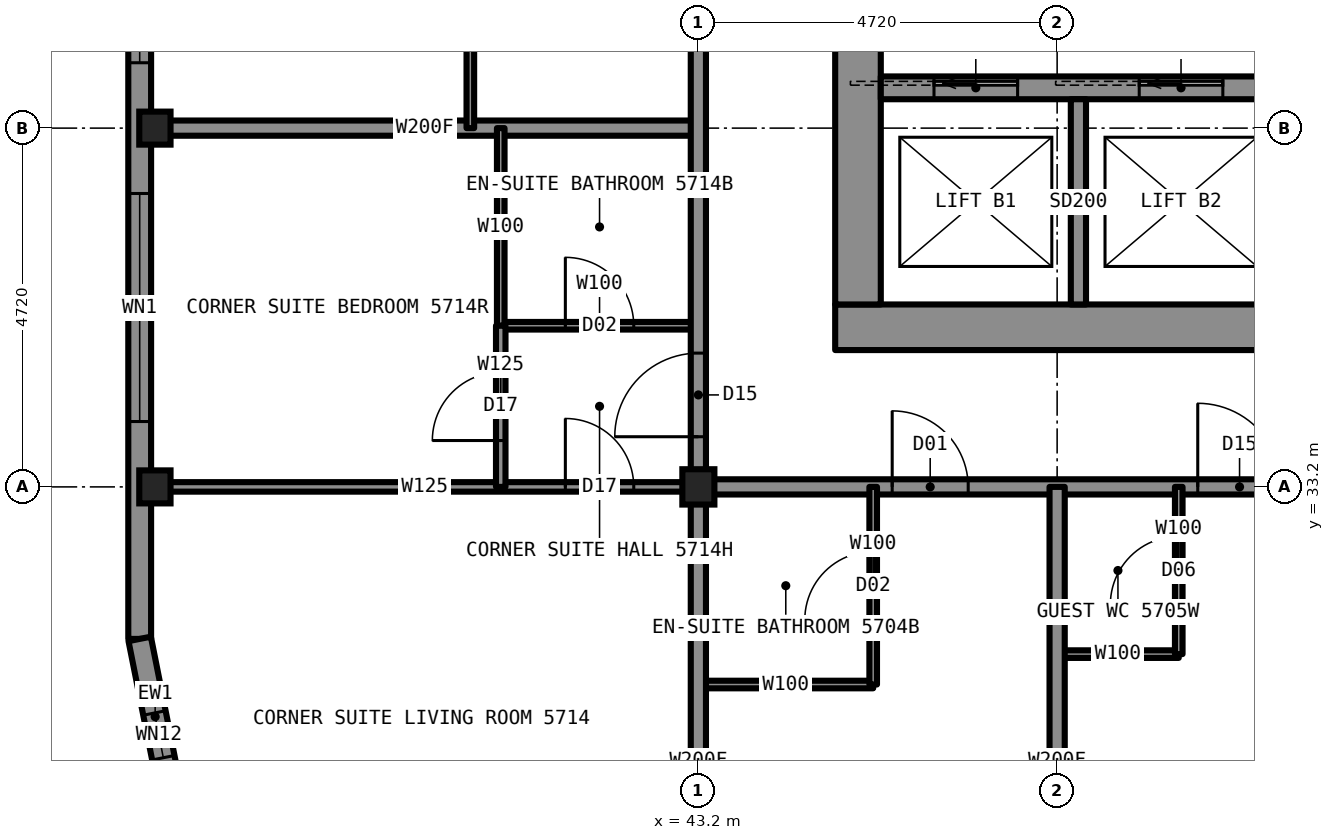
"""IFC4 building model, lengths in metres.
Left out: names, types, materials, properties, quantities, classifications, styles, units other than length and angle.
Written with IfcOpenShell. Run it as: python <this file> out.ifc"""

import sys

from ifc_helpers import new_model, si_unit, direction, frame, frame_2d, origin, origin_2d, place, context, subcontext, project, spatial, rectangle, i_section, extrude, element, fill, save


model = new_model("IFC4")
c1 = context("Model", 3, precision=1e-05, world=origin(), true_north=direction((0.0, 1.0)))
c2 = subcontext(c1, "Body", "Model", "MODEL_VIEW")
j1 = project(units=[si_unit("LENGTHUNIT", "METRE"), si_unit("PLANEANGLEUNIT", "RADIAN")], contexts=[c1])
p1 = place(None, origin())
s1 = spatial("IfcSite", under=j1, at=p1, CompositionType="ELEMENT")
p2 = place(p1, origin())
s2 = spatial("IfcBuilding", under=s1, at=p2, CompositionType="ELEMENT")
p3 = place(p2, frame((0.0, 0.0, 203.8)))
s3 = spatial("IfcBuildingStorey", under=s2, at=p3, CompositionType="ELEMENT", Elevation=203.8)
for number, where, z_axis, x_axis in (
    (1, (36.05, 33.2, 0.0), (0.0, 0.0, 1.0), (1.0, 0.0, 0.0)),
    (2, (36.05, 37.92, 0.0), (0.0, 0.0, 1.0), (1.0, 0.0, 0.0)),
):
    element("IfcColumn", number, at=place(p3, frame(where, z_axis=z_axis, x_axis=x_axis)), inside=s3, PredefinedType="COLUMN", context=c2, shape_type="SweptSolid", body=[
        extrude(i_section(OverallWidth=0.411, OverallDepth=0.434, WebThickness=0.036, FlangeThickness=0.057, at=origin_2d()), origin(), (0.0, 0.0, 1.0), 3.5),
    ])
p4 = place(p3, frame((43.2, 33.2, 0.0), z_axis=(0.0, 0.0, 1.0), x_axis=(1.0, 0.0, 0.0)))
e3 = element("IfcColumn", 3, at=p4, inside=s3, PredefinedType="COLUMN", context=c2, shape_type="SweptSolid", body=[
    extrude(i_section(OverallWidth=0.422, OverallDepth=0.465, WebThickness=0.045, FlangeThickness=0.073, at=origin_2d()), origin(), (0.0, 0.0, 1.0), 3.5),
])
p5 = place(p3, frame((45.0, 35.3, 0.0), z_axis=(0.0, 0.0, 1.0), x_axis=(1.0, 0.0, 0.0)))
e4 = element("IfcWall", 4, at=p5, inside=s3, PredefinedType="SHEAR", context=c2, shape_type="SweptSolid", body=[
    extrude(rectangle(XDim=20.0, YDim=0.6, at=frame_2d((10.0, 0.0))), origin(), (0.0, 0.0, 1.0), 3.5),
])
p6 = place(p3, frame((45.3, 35.6, 0.0), z_axis=(0.0, 0.0, 1.0), x_axis=(0.0, 1.0, 0.0)))
e5 = element("IfcWall", 5, at=p6, inside=s3, PredefinedType="SHEAR", context=c2, shape_type="SweptSolid", body=[
    extrude(rectangle(XDim=18.8, YDim=0.6, at=frame_2d((9.4, 0.0))), origin(), (0.0, 0.0, 1.0), 3.5),
])
p7 = place(p6, frame((13.4, 0.0, 0.0)))
e6 = element("IfcOpeningElement", 6, at=p7, cuts=e5, PredefinedType="OPENING", context=c2, shape_type="SweptSolid", body=[
    extrude(rectangle(XDim=1.8, YDim=2.2, at=frame_2d((0.9, 1.1))), frame((0.0, 0.31, 0.0), z_axis=(0.0, -1.0, 0.0), x_axis=(1.0, 0.0, 0.0)), (0.0, 0.0, 1.0), 0.62),
])
p8 = place(p6, frame((3.6, 0.0, 0.0)))
e7 = element("IfcOpeningElement", 7, at=p8, cuts=e5, PredefinedType="OPENING", context=c2, shape_type="SweptSolid", body=[
    extrude(rectangle(XDim=1.8, YDim=2.2, at=frame_2d((0.9, 1.1))), frame((0.0, 0.31, 0.0), z_axis=(0.0, -1.0, 0.0), x_axis=(1.0, 0.0, 0.0)), (0.0, 0.0, 1.0), 0.62),
])
p9 = place(p6, frame((6.4, 0.0, 0.0)))
e8 = element("IfcOpeningElement", 8, at=p9, cuts=e5, PredefinedType="OPENING", context=c2, shape_type="SweptSolid", body=[
    extrude(rectangle(XDim=1.2, YDim=2.2, at=frame_2d((0.6, 1.1))), frame((0.0, 0.31, 0.0), z_axis=(0.0, -1.0, 0.0), x_axis=(1.0, 0.0, 0.0)), (0.0, 0.0, 1.0), 0.62),
])
p10 = place(p3, frame((45.6, 38.45, 0.0), z_axis=(0.0, 0.0, 1.0), x_axis=(1.0, 0.0, 0.0)))
e9 = element("IfcWall", 9, at=p10, inside=s3, PredefinedType="SHEAR", context=c2, shape_type="SweptSolid", body=[
    extrude(rectangle(XDim=18.8, YDim=0.3, at=frame_2d((9.4, 0.0))), origin(), (0.0, 0.0, 1.0), 3.5),
])
p11 = place(p10, frame((0.7, 0.0, 0.0)))
e10 = element("IfcOpeningElement", 10, at=p11, cuts=e9, PredefinedType="OPENING", context=c2, shape_type="SweptSolid", body=[
    extrude(rectangle(XDim=1.1, YDim=2.2, at=frame_2d((0.55, 1.1))), frame((0.0, 0.16, 0.0), z_axis=(0.0, -1.0, 0.0), x_axis=(1.0, 0.0, 0.0)), (0.0, 0.0, 1.0), 0.32),
])
p12 = place(p10, frame((3.4, 0.0, 0.0)))
e11 = element("IfcOpeningElement", 11, at=p12, cuts=e9, PredefinedType="OPENING", context=c2, shape_type="SweptSolid", body=[
    extrude(rectangle(XDim=1.1, YDim=2.2, at=frame_2d((0.55, 1.1))), frame((0.0, 0.16, 0.0), z_axis=(0.0, -1.0, 0.0), x_axis=(1.0, 0.0, 0.0)), (0.0, 0.0, 1.0), 0.32),
])
p13 = place(p10, frame((6.1, 0.0, 0.0)))
e12 = element("IfcOpeningElement", 12, at=p13, cuts=e9, PredefinedType="OPENING", context=c2, shape_type="SweptSolid", body=[
    extrude(rectangle(XDim=1.1, YDim=2.2, at=frame_2d((0.55, 1.1))), frame((0.0, 0.16, 0.0), z_axis=(0.0, -1.0, 0.0), x_axis=(1.0, 0.0, 0.0)), (0.0, 0.0, 1.0), 0.32),
])
p14 = place(p10, frame((8.8, 0.0, 0.0)))
e13 = element("IfcOpeningElement", 13, at=p14, cuts=e9, PredefinedType="OPENING", context=c2, shape_type="SweptSolid", body=[
    extrude(rectangle(XDim=1.1, YDim=2.2, at=frame_2d((0.55, 1.1))), frame((0.0, 0.16, 0.0), z_axis=(0.0, -1.0, 0.0), x_axis=(1.0, 0.0, 0.0)), (0.0, 0.0, 1.0), 0.32),
])
p15 = place(p3, frame((43.2, 33.2, 0.0), z_axis=(0.0, 0.0, 1.0), x_axis=(1.0, 0.0, 0.0)))
e14 = element("IfcWall", 14, at=p15, inside=s3, PredefinedType="PARTITIONING", context=c2, shape_type="SweptSolid", body=[
    extrude(rectangle(XDim=23.6, YDim=0.2, at=frame_2d((11.8, 0.0))), origin(), (0.0, 0.0, 1.0), 3.33),
])
p16 = place(p15, frame((2.55, 0.0, 0.0)))
e15 = element("IfcOpeningElement", 15, at=p16, cuts=e14, PredefinedType="OPENING", context=c2, shape_type="SweptSolid", body=[
    extrude(rectangle(XDim=1.0, YDim=2.2, at=frame_2d((0.5, 1.1))), frame((0.0, 0.11, 0.0), z_axis=(0.0, -1.0, 0.0), x_axis=(1.0, 0.0, 0.0)), (0.0, 0.0, 1.0), 0.22),
])
p17 = place(p15, frame((6.57, 0.0, 0.0)))
e16 = element("IfcOpeningElement", 16, at=p17, cuts=e14, PredefinedType="OPENING", context=c2, shape_type="SweptSolid", body=[
    extrude(rectangle(XDim=1.1, YDim=2.2, at=frame_2d((0.55, 1.1))), frame((0.0, 0.11, 0.0), z_axis=(0.0, -1.0, 0.0), x_axis=(1.0, 0.0, 0.0)), (0.0, 0.0, 1.0), 0.22),
])
p18 = place(p15, frame((21.14, 0.0, 0.0)))
e17 = element("IfcOpeningElement", 17, at=p18, cuts=e14, PredefinedType="OPENING", context=c2, shape_type="SweptSolid", body=[
    extrude(rectangle(XDim=1.0, YDim=2.2, at=frame_2d((0.5, 1.1))), frame((0.0, 0.11, 0.0), z_axis=(0.0, -1.0, 0.0), x_axis=(1.0, 0.0, 0.0)), (0.0, 0.0, 1.0), 0.22),
])
p19 = place(p3, frame((36.0, 33.2, 0.0), z_axis=(0.0, 0.0, 1.0), x_axis=(1.0, 0.0, 0.0)))
e18 = element("IfcWall", 18, at=p19, inside=s3, PredefinedType="PARTITIONING", context=c2, shape_type="SweptSolid", body=[
    extrude(rectangle(XDim=7.2, YDim=0.125, at=frame_2d((3.6, 0.0))), origin(), (0.0, 0.0, 1.0), 2.573),
])
p20 = place(p19, frame((5.45, 0.0, 0.0)))
e19 = element("IfcOpeningElement", 19, at=p20, cuts=e18, PredefinedType="OPENING", context=c2, shape_type="SweptSolid", body=[
    extrude(rectangle(XDim=0.9, YDim=2.2, at=frame_2d((0.45, 1.1))), frame((0.0, 0.073, 0.0), z_axis=(0.0, -1.0, 0.0), x_axis=(1.0, 0.0, 0.0)), (0.0, 0.0, 1.0), 0.145),
])
p21 = place(p3, frame((47.92, 31.0, 0.0), z_axis=(0.0, 0.0, 1.0), x_axis=(1.0, 0.0, 0.0)))
e20 = element("IfcWall", 20, at=p21, inside=s3, PredefinedType="PARTITIONING", context=c2, shape_type="SweptSolid", body=[
    extrude(rectangle(XDim=1.6, YDim=0.1, at=frame_2d((0.8, 0.0))), origin(), (0.0, 0.0, 1.0), 3.33),
])
p22 = place(p3, frame((43.2, 30.6, 0.0), z_axis=(0.0, 0.0, 1.0), x_axis=(1.0, 0.0, 0.0)))
e21 = element("IfcWall", 21, at=p22, inside=s3, PredefinedType="PARTITIONING", context=c2, shape_type="SweptSolid", body=[
    extrude(rectangle(XDim=2.3, YDim=0.1, at=frame_2d((1.15, 0.0))), origin(), (0.0, 0.0, 1.0), 3.33),
])
p23 = place(p3, frame((36.0, 37.92, 0.0), z_axis=(0.0, 0.0, 1.0), x_axis=(1.0, 0.0, 0.0)))
e22 = element("IfcWall", 22, at=p23, inside=s3, PredefinedType="PARTITIONING", context=c2, shape_type="SweptSolid", body=[
    extrude(rectangle(XDim=7.2, YDim=0.2, at=frame_2d((3.6, 0.0))), origin(), (0.0, 0.0, 1.0), 2.573),
])
p24 = place(p3, frame((40.6, 35.32, 0.0), z_axis=(0.0, 0.0, 1.0), x_axis=(1.0, 0.0, 0.0)))
e23 = element("IfcWall", 23, at=p24, inside=s3, PredefinedType="PARTITIONING", context=c2, shape_type="SweptSolid", body=[
    extrude(rectangle(XDim=2.6, YDim=0.1, at=frame_2d((1.3, 0.0))), origin(), (0.0, 0.0, 1.0), 3.33),
])
p25 = place(p24, frame((0.85, 0.0, 0.0)))
e24 = element("IfcOpeningElement", 24, at=p25, cuts=e23, PredefinedType="OPENING", context=c2, shape_type="SweptSolid", body=[
    extrude(rectangle(XDim=0.9, YDim=2.1, at=frame_2d((0.45, 1.05))), frame((0.0, 0.06, 0.0), z_axis=(0.0, -1.0, 0.0), x_axis=(1.0, 0.0, 0.0)), (0.0, 0.0, 1.0), 0.12),
])
p26 = place(p3, frame((43.2, 33.2, 0.0), z_axis=(0.0, 0.0, 1.0), x_axis=(0.0, 1.0, 0.0)))
e25 = element("IfcWall", 25, at=p26, inside=s3, PredefinedType="PARTITIONING", context=c2, shape_type="SweptSolid", body=[
    extrude(rectangle(XDim=23.58, YDim=0.2, at=frame_2d((11.79, 0.0))), origin(), (0.0, 0.0, 1.0), 3.33),
])
p27 = place(p26, frame((7.72, 0.0, 0.0)))
e26 = element("IfcOpeningElement", 26, at=p27, cuts=e25, PredefinedType="OPENING", context=c2, shape_type="SweptSolid", body=[
    extrude(rectangle(XDim=1.0, YDim=2.2, at=frame_2d((0.5, 1.1))), frame((0.0, 0.11, 0.0), z_axis=(0.0, -1.0, 0.0), x_axis=(1.0, 0.0, 0.0)), (0.0, 0.0, 1.0), 0.22),
])
p28 = place(p26, frame((17.31, 0.0, 0.0)))
e27 = element("IfcOpeningElement", 27, at=p28, cuts=e25, PredefinedType="OPENING", context=c2, shape_type="SweptSolid", body=[
    extrude(rectangle(XDim=1.0, YDim=2.2, at=frame_2d((0.5, 1.1))), frame((0.0, 0.11, 0.0), z_axis=(0.0, -1.0, 0.0), x_axis=(1.0, 0.0, 0.0)), (0.0, 0.0, 1.0), 0.22),
])
p29 = place(p26, frame((22.05, 0.0, 0.0)))
e28 = element("IfcOpeningElement", 28, at=p29, cuts=e25, PredefinedType="OPENING", context=c2, shape_type="SweptSolid", body=[
    extrude(rectangle(XDim=1.1, YDim=2.2, at=frame_2d((0.55, 1.1))), frame((0.0, 0.11, 0.0), z_axis=(0.0, -1.0, 0.0), x_axis=(1.0, 0.0, 0.0)), (0.0, 0.0, 1.0), 0.22),
])
p30 = place(p26, frame((0.66, 0.0, 0.0)))
e29 = element("IfcOpeningElement", 29, at=p30, cuts=e25, PredefinedType="OPENING", context=c2, shape_type="SweptSolid", body=[
    extrude(rectangle(XDim=1.1, YDim=2.2, at=frame_2d((0.55, 1.1))), frame((0.0, 0.11, 0.0), z_axis=(0.0, -1.0, 0.0), x_axis=(1.0, 0.0, 0.0)), (0.0, 0.0, 1.0), 0.22),
])
p31 = place(p3, frame((43.2, 26.0, 0.0), z_axis=(0.0, 0.0, 1.0), x_axis=(0.0, 1.0, 0.0)))
e30 = element("IfcWall", 30, at=p31, inside=s3, PredefinedType="PARTITIONING", context=c2, shape_type="SweptSolid", body=[
    extrude(rectangle(XDim=7.2, YDim=0.2, at=frame_2d((3.6, 0.0))), origin(), (0.0, 0.0, 1.0), 2.573),
])
p32 = place(p3, frame((40.6, 35.32, 0.0), z_axis=(0.0, 0.0, 1.0), x_axis=(0.0, 1.0, 0.0)))
e31 = element("IfcWall", 31, at=p32, inside=s3, PredefinedType="PARTITIONING", context=c2, shape_type="SweptSolid", body=[
    extrude(rectangle(XDim=2.6, YDim=0.1, at=frame_2d((1.3, 0.0))), origin(), (0.0, 0.0, 1.0), 3.33),
])
p33 = place(p3, frame((40.6, 33.2, 0.0), z_axis=(0.0, 0.0, 1.0), x_axis=(0.0, 1.0, 0.0)))
e32 = element("IfcWall", 32, at=p33, inside=s3, PredefinedType="PARTITIONING", context=c2, shape_type="SweptSolid", body=[
    extrude(rectangle(XDim=2.12, YDim=0.125, at=frame_2d((1.06, 0.0))), origin(), (0.0, 0.0, 1.0), 3.33),
])
p34 = place(p33, frame((0.61, 0.0, 0.0)))
e33 = element("IfcOpeningElement", 33, at=p34, cuts=e32, PredefinedType="OPENING", context=c2, shape_type="SweptSolid", body=[
    extrude(rectangle(XDim=0.9, YDim=2.2, at=frame_2d((0.45, 1.1))), frame((0.0, 0.073, 0.0), z_axis=(0.0, -1.0, 0.0), x_axis=(1.0, 0.0, 0.0)), (0.0, 0.0, 1.0), 0.145),
])
p35 = place(p3, frame((40.2, 37.92, 0.0), z_axis=(0.0, 0.0, 1.0), x_axis=(0.0, 1.0, 0.0)))
e34 = element("IfcWall", 34, at=p35, inside=s3, PredefinedType="PARTITIONING", context=c2, shape_type="SweptSolid", body=[
    extrude(rectangle(XDim=2.6, YDim=0.1, at=frame_2d((1.3, 0.0))), origin(), (0.0, 0.0, 1.0), 3.33),
])
p36 = place(p3, frame((49.52, 31.0, 0.0), z_axis=(0.0, 0.0, 1.0), x_axis=(0.0, 1.0, 0.0)))
e35 = element("IfcWall", 35, at=p36, inside=s3, PredefinedType="PARTITIONING", context=c2, shape_type="SweptSolid", body=[
    extrude(rectangle(XDim=2.2, YDim=0.1, at=frame_2d((1.1, 0.0))), origin(), (0.0, 0.0, 1.0), 3.33),
])
p37 = place(p36, frame((0.65, 0.0, 0.0)))
e36 = element("IfcOpeningElement", 36, at=p37, cuts=e35, PredefinedType="OPENING", context=c2, shape_type="SweptSolid", body=[
    extrude(rectangle(XDim=0.9, YDim=2.1, at=frame_2d((0.45, 1.05))), frame((0.0, 0.06, 0.0), z_axis=(0.0, -1.0, 0.0), x_axis=(1.0, 0.0, 0.0)), (0.0, 0.0, 1.0), 0.12),
])
p38 = place(p3, frame((47.92, 26.0, 0.0), z_axis=(0.0, 0.0, 1.0), x_axis=(0.0, 1.0, 0.0)))
e37 = element("IfcWall", 37, at=p38, inside=s3, PredefinedType="PARTITIONING", context=c2, shape_type="SweptSolid", body=[
    extrude(rectangle(XDim=7.2, YDim=0.2, at=frame_2d((3.6, 0.0))), origin(), (0.0, 0.0, 1.0), 2.573),
])
p39 = place(p3, frame((45.5, 30.6, 0.0), z_axis=(0.0, 0.0, 1.0), x_axis=(0.0, 1.0, 0.0)))
e38 = element("IfcWall", 38, at=p39, inside=s3, PredefinedType="PARTITIONING", context=c2, shape_type="SweptSolid", body=[
    extrude(rectangle(XDim=2.6, YDim=0.1, at=frame_2d((1.3, 0.0))), origin(), (0.0, 0.0, 1.0), 3.33),
])
p40 = place(p39, frame((0.85, 0.0, 0.0)))
e39 = element("IfcOpeningElement", 39, at=p40, cuts=e38, PredefinedType="OPENING", context=c2, shape_type="SweptSolid", body=[
    extrude(rectangle(XDim=0.9, YDim=2.1, at=frame_2d((0.45, 1.05))), frame((0.0, 0.06, 0.0), z_axis=(0.0, -1.0, 0.0), x_axis=(1.0, 0.0, 0.0)), (0.0, 0.0, 1.0), 0.12),
])
p41 = place(p3, frame((35.85, 58.8, 0.0), z_axis=(0.0, 0.0, 1.0), x_axis=(0.0, -1.0, 0.0)))
e40 = element("IfcWall", 40, at=p41, inside=s3, PredefinedType="SOLIDWALL", context=c2, shape_type="SweptSolid", body=[
    extrude(rectangle(XDim=27.6, YDim=0.3, at=frame_2d((13.8, 0.0))), origin(), (0.0, 0.0, 1.0), 2.83),
])
p42 = place(p41, frame((2.86, 0.0, 0.3)))
e41 = element("IfcOpeningElement", 41, at=p42, cuts=e40, PredefinedType="OPENING", context=c2, shape_type="SweptSolid", body=[
    extrude(rectangle(XDim=0.7, YDim=1.2, at=frame_2d((0.35, 0.6))), frame((0.0, 0.16, 0.0), z_axis=(0.0, -1.0, 0.0), x_axis=(1.0, 0.0, 0.0)), (0.0, 0.0, 1.0), 0.32),
])
p43 = place(p41, frame((7.58, 0.0, 0.3)))
e42 = element("IfcOpeningElement", 42, at=p43, cuts=e40, PredefinedType="OPENING", context=c2, shape_type="SweptSolid", body=[
    extrude(rectangle(XDim=3.0, YDim=2.0, at=frame_2d((1.5, 1.0))), frame((0.0, 0.16, 0.0), z_axis=(0.0, -1.0, 0.0), x_axis=(1.0, 0.0, 0.0)), (0.0, 0.0, 1.0), 0.32),
])
p44 = place(p41, frame((12.3, 0.0, 0.3)))
e43 = element("IfcOpeningElement", 43, at=p44, cuts=e40, PredefinedType="OPENING", context=c2, shape_type="SweptSolid", body=[
    extrude(rectangle(XDim=3.0, YDim=2.0, at=frame_2d((1.5, 1.0))), frame((0.0, 0.16, 0.0), z_axis=(0.0, -1.0, 0.0), x_axis=(1.0, 0.0, 0.0)), (0.0, 0.0, 1.0), 0.32),
])
p45 = place(p41, frame((17.02, 0.0, 0.3)))
e44 = element("IfcOpeningElement", 44, at=p45, cuts=e40, PredefinedType="OPENING", context=c2, shape_type="SweptSolid", body=[
    extrude(rectangle(XDim=3.0, YDim=2.0, at=frame_2d((1.5, 1.0))), frame((0.0, 0.16, 0.0), z_axis=(0.0, -1.0, 0.0), x_axis=(1.0, 0.0, 0.0)), (0.0, 0.0, 1.0), 0.32),
])
p46 = place(p41, frame((23.99, 0.0, 0.3)))
e45 = element("IfcOpeningElement", 45, at=p46, cuts=e40, PredefinedType="OPENING", context=c2, shape_type="SweptSolid", body=[
    extrude(rectangle(XDim=0.7, YDim=1.2, at=frame_2d((0.35, 0.6))), frame((0.0, 0.16, 0.0), z_axis=(0.0, -1.0, 0.0), x_axis=(1.0, 0.0, 0.0)), (0.0, 0.0, 1.0), 0.32),
])
p47 = place(p3, frame((35.85, 31.2, 0.0), z_axis=(0.0, 0.0, 1.0), x_axis=(0.195081421501, -0.980787050784, 0.0)))
e46 = element("IfcWall", 46, at=p47, inside=s3, PredefinedType="SOLIDWALL", context=c2, shape_type="SweptSolid", body=[
    extrude(rectangle(XDim=2.087, YDim=0.3, at=frame_2d((1.044, 0.0))), origin(), (0.0, 0.0, 1.0), 3.33),
])
p48 = place(p47, frame((0.444, 0.0, 0.3)))
e47 = element("IfcOpeningElement", 47, at=p48, cuts=e46, PredefinedType="OPENING", context=c2, shape_type="SweptSolid", body=[
    extrude(rectangle(XDim=1.2, YDim=2.0, at=frame_2d((0.6, 1.0))), frame((0.0, 0.16, 0.0), z_axis=(0.0, -1.0, 0.0), x_axis=(1.0, 0.0, 0.0)), (0.0, 0.0, 1.0), 0.32),
])
p49 = place(p3, frame((48.2, 35.6, 0.0), z_axis=(0.0, 0.0, 1.0), x_axis=(0.0, 1.0, 0.0)))
e48 = element("IfcWall", 48, at=p49, inside=s3, PredefinedType="PARTITIONING", context=c2, shape_type="SweptSolid", body=[
    extrude(rectangle(XDim=2.7, YDim=0.2, at=frame_2d((1.35, 0.0))), origin(), (0.0, 0.0, 1.0), 3.33),
])
p50 = place(p16, origin())
e49 = element("IfcDoor", 49, at=p50, inside=s3, OperationType="SINGLE_SWING_LEFT", PredefinedType="DOOR", context=c2, shape_type="SweptSolid", body=[
    extrude(rectangle(XDim=1.0, YDim=2.2, at=frame_2d((0.5, 1.1))), frame((0.0, 0.025, 0.0), z_axis=(0.0, -1.0, 0.0), x_axis=(1.0, 0.0, 0.0)), (0.0, 0.0, 1.0), 0.05),
])
fill(e15, e49)
p51 = place(p40, origin())
e50 = element("IfcDoor", 50, at=p51, inside=s3, OperationType="SINGLE_SWING_RIGHT", PredefinedType="DOOR", context=c2, shape_type="SweptSolid", body=[
    extrude(rectangle(XDim=0.9, YDim=2.1, at=frame_2d((0.45, 1.05))), frame((0.0, 0.025, 0.0), z_axis=(0.0, -1.0, 0.0), x_axis=(1.0, 0.0, 0.0)), (0.0, 0.0, 1.0), 0.05),
])
fill(e39, e50)
p52 = place(p17, origin())
e51 = element("IfcDoor", 51, at=p52, inside=s3, OperationType="SINGLE_SWING_LEFT", PredefinedType="DOOR", context=c2, shape_type="SweptSolid", body=[
    extrude(rectangle(XDim=1.1, YDim=2.2, at=frame_2d((0.55, 1.1))), frame((0.0, 0.025, 0.0), z_axis=(0.0, -1.0, 0.0), x_axis=(1.0, 0.0, 0.0)), (0.0, 0.0, 1.0), 0.05),
])
fill(e16, e51)
p53 = place(p37, origin())
e52 = element("IfcDoor", 52, at=p53, inside=s3, OperationType="SINGLE_SWING_LEFT", PredefinedType="DOOR", context=c2, shape_type="SweptSolid", body=[
    extrude(rectangle(XDim=0.9, YDim=2.1, at=frame_2d((0.45, 1.05))), frame((0.0, 0.025, 0.0), z_axis=(0.0, -1.0, 0.0), x_axis=(1.0, 0.0, 0.0)), (0.0, 0.0, 1.0), 0.05),
])
fill(e36, e52)
p54 = place(p20, origin())
e53 = element("IfcDoor", 53, at=p54, inside=s3, OperationType="SINGLE_SWING_LEFT", PredefinedType="DOOR", context=c2, shape_type="SweptSolid", body=[
    extrude(rectangle(XDim=0.9, YDim=2.2, at=frame_2d((0.45, 1.1))), frame((0.0, 0.025, 0.0), z_axis=(0.0, -1.0, 0.0), x_axis=(1.0, 0.0, 0.0)), (0.0, 0.0, 1.0), 0.05),
])
fill(e19, e53)
p55 = place(p25, origin())
e54 = element("IfcDoor", 54, at=p55, inside=s3, OperationType="SINGLE_SWING_RIGHT", PredefinedType="DOOR", context=c2, shape_type="SweptSolid", body=[
    extrude(rectangle(XDim=0.9, YDim=2.1, at=frame_2d((0.45, 1.05))), frame((0.0, 0.025, 0.0), z_axis=(0.0, -1.0, 0.0), x_axis=(1.0, 0.0, 0.0)), (0.0, 0.0, 1.0), 0.05),
])
fill(e24, e54)
p56 = place(p30, origin())
e55 = element("IfcDoor", 55, at=p56, inside=s3, OperationType="SINGLE_SWING_LEFT", PredefinedType="DOOR", context=c2, shape_type="SweptSolid", body=[
    extrude(rectangle(XDim=1.1, YDim=2.2, at=frame_2d((0.55, 1.1))), frame((0.0, 0.025, 0.0), z_axis=(0.0, -1.0, 0.0), x_axis=(1.0, 0.0, 0.0)), (0.0, 0.0, 1.0), 0.05),
])
fill(e29, e55)
p57 = place(p34, origin())
e56 = element("IfcDoor", 56, at=p57, inside=s3, OperationType="SINGLE_SWING_LEFT", PredefinedType="DOOR", context=c2, shape_type="SweptSolid", body=[
    extrude(rectangle(XDim=0.9, YDim=2.2, at=frame_2d((0.45, 1.1))), frame((0.0, 0.025, 0.0), z_axis=(0.0, -1.0, 0.0), x_axis=(1.0, 0.0, 0.0)), (0.0, 0.0, 1.0), 0.05),
])
fill(e33, e56)
p58 = place(p45, origin())
e57 = element("IfcWindow", 57, at=p58, inside=s3, PartitioningType="SINGLE_PANEL", PredefinedType="WINDOW", context=c2, shape_type="SweptSolid", body=[
    extrude(rectangle(XDim=3.0, YDim=2.0, at=frame_2d((1.5, 1.0))), frame((0.0, 0.13, 0.0), z_axis=(0.0, -1.0, 0.0), x_axis=(1.0, 0.0, 0.0)), (0.0, 0.0, 1.0), 0.06),
])
fill(e44, e57)
p59 = place(p46, origin())
e58 = element("IfcWindow", 58, at=p59, inside=s3, PartitioningType="SINGLE_PANEL", PredefinedType="WINDOW", context=c2, shape_type="SweptSolid", body=[
    extrude(rectangle(XDim=0.7, YDim=1.2, at=frame_2d((0.35, 0.6))), frame((0.0, 0.13, 0.0), z_axis=(0.0, -1.0, 0.0), x_axis=(1.0, 0.0, 0.0)), (0.0, 0.0, 1.0), 0.06),
])
fill(e45, e58)
p60 = place(p48, origin())
e59 = element("IfcWindow", 59, at=p60, inside=s3, PartitioningType="SINGLE_PANEL", PredefinedType="WINDOW", context=c2, shape_type="SweptSolid", body=[
    extrude(rectangle(XDim=1.2, YDim=2.0, at=frame_2d((0.6, 1.0))), frame((0.0, 0.13, 0.0), z_axis=(0.0, -1.0, 0.0), x_axis=(1.0, 0.0, 0.0)), (0.0, 0.0, 1.0), 0.06),
])
fill(e47, e59)
p61 = place(p11, origin())
e60 = element("IfcDoor", 60, at=p61, inside=s3, OperationType="SLIDING_TO_LEFT", PredefinedType="DOOR", context=c2, shape_type="SweptSolid", body=[
    extrude(rectangle(XDim=1.1, YDim=2.2, at=frame_2d((0.55, 1.1))), frame((0.0, 0.025, 0.0), z_axis=(0.0, -1.0, 0.0), x_axis=(1.0, 0.0, 0.0)), (0.0, 0.0, 1.0), 0.05),
])
fill(e10, e60)
p62 = place(p12, origin())
e61 = element("IfcDoor", 61, at=p62, inside=s3, OperationType="SLIDING_TO_LEFT", PredefinedType="DOOR", context=c2, shape_type="SweptSolid", body=[
    extrude(rectangle(XDim=1.1, YDim=2.2, at=frame_2d((0.55, 1.1))), frame((0.0, 0.025, 0.0), z_axis=(0.0, -1.0, 0.0), x_axis=(1.0, 0.0, 0.0)), (0.0, 0.0, 1.0), 0.05),
])
fill(e11, e61)
save(model, sys.argv[1])
